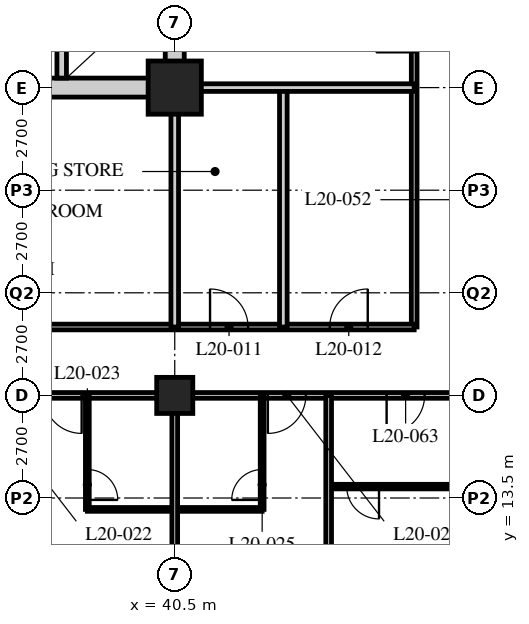
"""IFC4 building model, lengths in metres.
Left out: names, types, materials, properties, quantities, classifications, styles, units other than length and angle.
Written with IfcOpenShell. Run it as: python <this file> out.ifc"""

import sys

from ifc_helpers import new_model, si_unit, direction, frame, frame_2d, origin, origin_2d, place, context, subcontext, project, spatial, rectangle, hollow_rectangle, extrude, element, fill, save


model = new_model("IFC4")
c1 = context("Model", 3, precision=1e-05, world=origin(), true_north=direction((0.0, 1.0)))
c2 = subcontext(c1, "Body", "Model", "MODEL_VIEW")
j1 = project(units=[si_unit("LENGTHUNIT", "METRE"), si_unit("PLANEANGLEUNIT", "RADIAN")], contexts=[c1])
p1 = place(None, origin())
s1 = spatial("IfcSite", under=j1, at=p1, CompositionType="ELEMENT")
p2 = place(p1, origin())
s2 = spatial("IfcBuilding", under=s1, at=p2, CompositionType="ELEMENT")
p3 = place(p2, frame((0.0, 0.0, 80.6)))
s3 = spatial("IfcBuildingStorey", under=s2, at=p3, CompositionType="ELEMENT", Elevation=80.6)
p4 = place(p3, frame((40.5, 16.2, 0.0), z_axis=(0.0, 0.0, 1.0), x_axis=(1.0, 0.0, 0.0)))
e1 = element("IfcColumn", 1, at=p4, inside=s3, PredefinedType="COLUMN", context=c2, shape_type="SweptSolid", body=[
    extrude(hollow_rectangle(XDim=0.95, YDim=0.95, WallThickness=0.095, at=origin_2d()), origin(), (0.0, 0.0, 1.0), 3.4),
])
p5 = place(p3, frame((40.5, 24.3, 0.0), z_axis=(0.0, 0.0, 1.0), x_axis=(1.0, 0.0, 0.0)))
e2 = element("IfcColumn", 2, at=p5, inside=s3, PredefinedType="COLUMN", context=c2, shape_type="SweptSolid", body=[
    extrude(hollow_rectangle(XDim=1.4, YDim=1.4, WallThickness=0.12, at=origin_2d()), origin(), (0.0, 0.0, 1.0), 3.4),
])
p6 = place(p3, frame((12.15, 16.2, 0.0), z_axis=(0.0, 0.0, 1.0), x_axis=(1.0, 0.0, 0.0)))
e3 = element("IfcWall", 3, at=p6, inside=s3, PredefinedType="PARTITIONING", context=c2, shape_type="SweptSolid", body=[
    extrude(rectangle(XDim=36.45, YDim=0.15, at=frame_2d((18.225, 0.0))), origin(), (0.0, 0.0, 1.0), 2.428),
])
p7 = place(p6, frame((6.5, 0.0, 0.0)))
e4 = element("IfcOpeningElement", 4, at=p7, cuts=e3, PredefinedType="OPENING", context=c2, shape_type="SweptSolid", body=[
    extrude(rectangle(XDim=1.0, YDim=2.1, at=frame_2d((0.5, 1.05))), frame((0.0, 0.085, 0.0), z_axis=(0.0, -1.0, 0.0), x_axis=(1.0, 0.0, 0.0)), (0.0, 0.0, 1.0), 0.17),
])
p8 = place(p6, frame((8.4, 0.0, 0.0)))
e5 = element("IfcOpeningElement", 5, at=p8, cuts=e3, PredefinedType="OPENING", context=c2, shape_type="SweptSolid", body=[
    extrude(rectangle(XDim=1.0, YDim=2.1, at=frame_2d((0.5, 1.05))), frame((0.0, 0.085, 0.0), z_axis=(0.0, -1.0, 0.0), x_axis=(1.0, 0.0, 0.0)), (0.0, 0.0, 1.0), 0.17),
])
p9 = place(p6, frame((14.9, 0.0, 0.0)))
e6 = element("IfcOpeningElement", 6, at=p9, cuts=e3, PredefinedType="OPENING", context=c2, shape_type="SweptSolid", body=[
    extrude(rectangle(XDim=1.0, YDim=2.1, at=frame_2d((0.5, 1.05))), frame((0.0, 0.085, 0.0), z_axis=(0.0, -1.0, 0.0), x_axis=(1.0, 0.0, 0.0)), (0.0, 0.0, 1.0), 0.17),
])
p10 = place(p6, frame((16.5, 0.0, 0.0)))
e7 = element("IfcOpeningElement", 7, at=p10, cuts=e3, PredefinedType="OPENING", context=c2, shape_type="SweptSolid", body=[
    extrude(rectangle(XDim=1.0, YDim=2.1, at=frame_2d((0.5, 1.05))), frame((0.0, 0.085, 0.0), z_axis=(0.0, -1.0, 0.0), x_axis=(1.0, 0.0, 0.0)), (0.0, 0.0, 1.0), 0.17),
])
p11 = place(p6, frame((22.7, 0.0, 0.0)))
e8 = element("IfcOpeningElement", 8, at=p11, cuts=e3, PredefinedType="OPENING", context=c2, shape_type="SweptSolid", body=[
    extrude(rectangle(XDim=1.0, YDim=2.1, at=frame_2d((0.5, 1.05))), frame((0.0, 0.085, 0.0), z_axis=(0.0, -1.0, 0.0), x_axis=(1.0, 0.0, 0.0)), (0.0, 0.0, 1.0), 0.17),
])
p12 = place(p6, frame((24.9, 0.0, 0.0)))
e9 = element("IfcOpeningElement", 9, at=p12, cuts=e3, PredefinedType="OPENING", context=c2, shape_type="SweptSolid", body=[
    extrude(rectangle(XDim=1.0, YDim=2.1, at=frame_2d((0.5, 1.05))), frame((0.0, 0.085, 0.0), z_axis=(0.0, -1.0, 0.0), x_axis=(1.0, 0.0, 0.0)), (0.0, 0.0, 1.0), 0.17),
])
p13 = place(p6, frame((30.8, 0.0, 0.0)))
e10 = element("IfcOpeningElement", 10, at=p13, cuts=e3, PredefinedType="OPENING", context=c2, shape_type="SweptSolid", body=[
    extrude(rectangle(XDim=1.0, YDim=2.1, at=frame_2d((0.5, 1.05))), frame((0.0, 0.085, 0.0), z_axis=(0.0, -1.0, 0.0), x_axis=(1.0, 0.0, 0.0)), (0.0, 0.0, 1.0), 0.17),
])
p14 = place(p6, frame((1.525, 0.0, 0.0)))
e11 = element("IfcOpeningElement", 11, at=p14, cuts=e3, PredefinedType="OPENING", context=c2, shape_type="SweptSolid", body=[
    extrude(rectangle(XDim=1.0, YDim=2.1, at=frame_2d((0.5, 1.05))), frame((0.0, 0.085, 0.0), z_axis=(0.0, -1.0, 0.0), x_axis=(1.0, 0.0, 0.0)), (0.0, 0.0, 1.0), 0.17),
])
p15 = place(p6, frame((33.925, 0.0, 0.0)))
e12 = element("IfcOpeningElement", 12, at=p15, cuts=e3, PredefinedType="OPENING", context=c2, shape_type="SweptSolid", body=[
    extrude(rectangle(XDim=1.0, YDim=2.1, at=frame_2d((0.5, 1.05))), frame((0.0, 0.085, 0.0), z_axis=(0.0, -1.0, 0.0), x_axis=(1.0, 0.0, 0.0)), (0.0, 0.0, 1.0), 0.17),
])
p16 = place(p3, frame((46.8, 18.0, 0.0), z_axis=(0.0, 0.0, 1.0), x_axis=(0.0, 1.0, 0.0)))
e13 = element("IfcWall", 13, at=p16, inside=s3, PredefinedType="PARTITIONING", context=c2, shape_type="SweptSolid", body=[
    extrude(rectangle(XDim=22.5, YDim=0.15, at=frame_2d((11.25, 0.0))), origin(), (0.0, 0.0, 1.0), 3.19),
])
p17 = place(p16, frame((7.229, 0.0, 0.0)))
e14 = element("IfcOpeningElement", 14, at=p17, cuts=e13, PredefinedType="OPENING", context=c2, shape_type="SweptSolid", body=[
    extrude(rectangle(XDim=1.0, YDim=2.1, at=frame_2d((0.5, 1.05))), frame((0.0, 0.085, 0.0), z_axis=(0.0, -1.0, 0.0), x_axis=(1.0, 0.0, 0.0)), (0.0, 0.0, 1.0), 0.17),
])
p18 = place(p16, frame((11.279, 0.0, 0.0)))
e15 = element("IfcOpeningElement", 15, at=p18, cuts=e13, PredefinedType="OPENING", context=c2, shape_type="SweptSolid", body=[
    extrude(rectangle(XDim=1.0, YDim=2.1, at=frame_2d((0.5, 1.05))), frame((0.0, 0.085, 0.0), z_axis=(0.0, -1.0, 0.0), x_axis=(1.0, 0.0, 0.0)), (0.0, 0.0, 1.0), 0.17),
])
p19 = place(p16, frame((14.7, 0.0, 0.0)))
e16 = element("IfcOpeningElement", 16, at=p19, cuts=e13, PredefinedType="OPENING", context=c2, shape_type="SweptSolid", body=[
    extrude(rectangle(XDim=1.0, YDim=2.1, at=frame_2d((0.5, 1.05))), frame((0.0, 0.085, 0.0), z_axis=(0.0, -1.0, 0.0), x_axis=(1.0, 0.0, 0.0)), (0.0, 0.0, 1.0), 0.17),
])
p20 = place(p16, frame((18.75, 0.0, 0.0)))
e17 = element("IfcOpeningElement", 17, at=p20, cuts=e13, PredefinedType="OPENING", context=c2, shape_type="SweptSolid", body=[
    extrude(rectangle(XDim=1.0, YDim=2.1, at=frame_2d((0.5, 1.05))), frame((0.0, 0.085, 0.0), z_axis=(0.0, -1.0, 0.0), x_axis=(1.0, 0.0, 0.0)), (0.0, 0.0, 1.0), 0.17),
])
p21 = place(p3, frame((29.56, 18.0, 0.0), z_axis=(0.0, 0.0, 1.0), x_axis=(1.0, 0.0, 0.0)))
e18 = element("IfcWall", 18, at=p21, inside=s3, PredefinedType="PARTITIONING", context=c2, shape_type="SweptSolid", body=[
    extrude(rectangle(XDim=17.24, YDim=0.15, at=frame_2d((8.62, 0.0))), origin(), (0.0, 0.0, 1.0), 3.19),
])
p22 = place(p21, frame((0.29, 0.0, 0.0)))
e19 = element("IfcOpeningElement", 19, at=p22, cuts=e18, PredefinedType="OPENING", context=c2, shape_type="SweptSolid", body=[
    extrude(rectangle(XDim=1.0, YDim=2.1, at=frame_2d((0.5, 1.05))), frame((0.0, 0.085, 0.0), z_axis=(0.0, -1.0, 0.0), x_axis=(1.0, 0.0, 0.0)), (0.0, 0.0, 1.0), 0.17),
])
p23 = place(p21, frame((5.765, 0.0, 0.0)))
e20 = element("IfcOpeningElement", 20, at=p23, cuts=e18, PredefinedType="OPENING", context=c2, shape_type="SweptSolid", body=[
    extrude(rectangle(XDim=1.0, YDim=2.1, at=frame_2d((0.5, 1.05))), frame((0.0, 0.085, 0.0), z_axis=(0.0, -1.0, 0.0), x_axis=(1.0, 0.0, 0.0)), (0.0, 0.0, 1.0), 0.17),
])
p24 = place(p21, frame((11.869, 0.0, 0.0)))
e21 = element("IfcOpeningElement", 21, at=p24, cuts=e18, PredefinedType="OPENING", context=c2, shape_type="SweptSolid", body=[
    extrude(rectangle(XDim=1.0, YDim=2.1, at=frame_2d((0.5, 1.05))), frame((0.0, 0.085, 0.0), z_axis=(0.0, -1.0, 0.0), x_axis=(1.0, 0.0, 0.0)), (0.0, 0.0, 1.0), 0.17),
])
p25 = place(p21, frame((15.019, 0.0, 0.0)))
e22 = element("IfcOpeningElement", 22, at=p25, cuts=e18, PredefinedType="OPENING", context=c2, shape_type="SweptSolid", body=[
    extrude(rectangle(XDim=1.0, YDim=2.1, at=frame_2d((0.5, 1.05))), frame((0.0, 0.085, 0.0), z_axis=(0.0, -1.0, 0.0), x_axis=(1.0, 0.0, 0.0)), (0.0, 0.0, 1.0), 0.17),
])
p26 = place(p3, frame((40.5, 18.0, 0.0), z_axis=(0.0, 0.0, 1.0), x_axis=(0.0, 1.0, 0.0)))
e23 = element("IfcWall", 23, at=p26, inside=s3, PredefinedType="SOLIDWALL", context=c2, shape_type="SweptSolid", body=[
    extrude(rectangle(XDim=6.3, YDim=0.2, at=frame_2d((3.15, 0.0))), origin(), (0.0, 0.0, 1.0), 2.428),
])
p27 = place(p3, frame((43.357, 18.0, 0.0), z_axis=(0.0, 0.0, 1.0), x_axis=(0.0, 1.0, 0.0)))
e24 = element("IfcWall", 24, at=p27, inside=s3, PredefinedType="SOLIDWALL", context=c2, shape_type="SweptSolid", body=[
    extrude(rectangle(XDim=6.3, YDim=0.2, at=frame_2d((3.15, 0.0))), origin(), (0.0, 0.0, 1.0), 3.19),
])
p28 = place(p3, frame((40.5, 24.3, 0.0), z_axis=(0.0, 0.0, 1.0), x_axis=(1.0, 0.0, 0.0)))
e25 = element("IfcWall", 25, at=p28, inside=s3, PredefinedType="SOLIDWALL", context=c2, shape_type="SweptSolid", body=[
    extrude(rectangle(XDim=6.3, YDim=0.2, at=frame_2d((3.15, 0.0))), origin(), (0.0, 0.0, 1.0), 2.428),
])
p29 = place(p3, frame((38.2, 13.2, 0.0), z_axis=(0.0, 0.0, 1.0), x_axis=(1.0, 0.0, 0.0)))
e26 = element("IfcWall", 26, at=p29, inside=s3, PredefinedType="PARTITIONING", context=c2, shape_type="SweptSolid", body=[
    extrude(rectangle(XDim=4.6, YDim=0.1, at=frame_2d((2.3, 0.0))), origin(), (0.0, 0.0, 1.0), 3.19),
])
p30 = place(p3, frame((38.2, 16.2, 0.0), z_axis=(0.0, 0.0, 1.0), x_axis=(0.0, -1.0, 0.0)))
e27 = element("IfcWall", 27, at=p30, inside=s3, PredefinedType="PARTITIONING", context=c2, shape_type="SweptSolid", body=[
    extrude(rectangle(XDim=3.0, YDim=0.1, at=frame_2d((1.5, 0.0))), origin(), (0.0, 0.0, 1.0), 3.19),
])
p31 = place(p30, frame((1.95, 0.0, 0.0)))
e28 = element("IfcOpeningElement", 28, at=p31, cuts=e27, PredefinedType="OPENING", context=c2, shape_type="SweptSolid", body=[
    extrude(rectangle(XDim=0.8, YDim=2.1, at=frame_2d((0.4, 1.05))), frame((0.0, 0.06, 0.0), z_axis=(0.0, -1.0, 0.0), x_axis=(1.0, 0.0, 0.0)), (0.0, 0.0, 1.0), 0.12),
])
p32 = place(p3, frame((40.5, 16.2, 0.0), z_axis=(0.0, 0.0, 1.0), x_axis=(0.0, -1.0, 0.0)))
e29 = element("IfcWall", 29, at=p32, inside=s3, PredefinedType="PARTITIONING", context=c2, shape_type="SweptSolid", body=[
    extrude(rectangle(XDim=15.9, YDim=0.15, at=frame_2d((7.95, 0.0))), origin(), (0.0, 0.0, 1.0), 2.428),
])
p33 = place(p3, frame((42.8, 16.2, 0.0), z_axis=(0.0, 0.0, 1.0), x_axis=(0.0, -1.0, 0.0)))
e30 = element("IfcWall", 30, at=p33, inside=s3, PredefinedType="PARTITIONING", context=c2, shape_type="SweptSolid", body=[
    extrude(rectangle(XDim=3.0, YDim=0.1, at=frame_2d((1.5, 0.0))), origin(), (0.0, 0.0, 1.0), 3.19),
])
p34 = place(p33, frame((1.95, 0.0, 0.0)))
e31 = element("IfcOpeningElement", 31, at=p34, cuts=e30, PredefinedType="OPENING", context=c2, shape_type="SweptSolid", body=[
    extrude(rectangle(XDim=0.8, YDim=2.1, at=frame_2d((0.4, 1.05))), frame((0.0, 0.06, 0.0), z_axis=(0.0, -1.0, 0.0), x_axis=(1.0, 0.0, 0.0)), (0.0, 0.0, 1.0), 0.12),
])
p35 = place(p3, frame((44.55, 13.8, 0.0), z_axis=(0.0, 0.0, 1.0), x_axis=(1.0, 0.0, 0.0)))
e32 = element("IfcWall", 32, at=p35, inside=s3, PredefinedType="PARTITIONING", context=c2, shape_type="SweptSolid", body=[
    extrude(rectangle(XDim=8.05, YDim=0.12, at=frame_2d((4.025, 0.0))), origin(), (0.0, 0.0, 1.0), 3.19),
])
p36 = place(p35, frame((0.475, 0.0, 0.0)))
e33 = element("IfcOpeningElement", 33, at=p36, cuts=e32, PredefinedType="OPENING", context=c2, shape_type="SweptSolid", body=[
    extrude(rectangle(XDim=0.85, YDim=2.1, at=frame_2d((0.425, 1.05))), frame((0.0, 0.07, 0.0), z_axis=(0.0, -1.0, 0.0), x_axis=(1.0, 0.0, 0.0)), (0.0, 0.0, 1.0), 0.14),
])
p37 = place(p35, frame((4.325, 0.0, 0.0)))
e34 = element("IfcOpeningElement", 34, at=p37, cuts=e32, PredefinedType="OPENING", context=c2, shape_type="SweptSolid", body=[
    extrude(rectangle(XDim=0.85, YDim=2.1, at=frame_2d((0.425, 1.05))), frame((0.0, 0.07, 0.0), z_axis=(0.0, -1.0, 0.0), x_axis=(1.0, 0.0, 0.0)), (0.0, 0.0, 1.0), 0.14),
])
p38 = place(p3, frame((44.55, 16.2, 0.0), z_axis=(0.0, 0.0, 1.0), x_axis=(0.0, -1.0, 0.0)))
e35 = element("IfcWall", 35, at=p38, inside=s3, PredefinedType="PARTITIONING", context=c2, shape_type="SweptSolid", body=[
    extrude(rectangle(XDim=15.9, YDim=0.15, at=frame_2d((7.95, 0.0))), origin(), (0.0, 0.0, 1.0), 3.19),
])
p39 = place(p3, frame((15.95, 24.3, 0.0), z_axis=(0.0, 0.0, 1.0), x_axis=(1.0, 0.0, 0.0)))
e36 = element("IfcWall", 36, at=p39, inside=s3, PredefinedType="SOLIDWALL", context=c2, shape_type="SweptSolid", body=[
    extrude(rectangle(XDim=24.8, YDim=0.5, at=frame_2d((12.4, 0.0))), origin(), (0.0, 0.0, 1.0), 2.428),
])
p40 = place(p39, frame((11.5, 0.0, 0.0)))
e37 = element("IfcOpeningElement", 37, at=p40, cuts=e36, PredefinedType="OPENING", context=c2, shape_type="SweptSolid", body=[
    extrude(rectangle(XDim=1.8, YDim=2.4, at=frame_2d((0.9, 1.2))), frame((0.0, 0.26, 0.0), z_axis=(0.0, -1.0, 0.0), x_axis=(1.0, 0.0, 0.0)), (0.0, 0.0, 1.0), 0.52),
])
p41 = place(p3, frame((40.5, 24.55, 0.0), z_axis=(0.0, 0.0, 1.0), x_axis=(0.0, 1.0, 0.0)))
e38 = element("IfcWall", 38, at=p41, inside=s3, PredefinedType="SOLIDWALL", context=c2, shape_type="SweptSolid", body=[
    extrude(rectangle(XDim=15.7, YDim=0.5, at=frame_2d((7.85, 0.0))), origin(), (0.0, 0.0, 1.0), 2.428),
])
p42 = place(p3, frame((37.525, 24.55, 0.0), z_axis=(0.0, 0.0, 1.0), x_axis=(0.0, 1.0, 0.0)))
e39 = element("IfcWall", 39, at=p42, inside=s3, PredefinedType="SOLIDWALL", context=c2, shape_type="SweptSolid", body=[
    extrude(rectangle(XDim=7.75, YDim=0.25, at=frame_2d((3.875, 0.0))), origin(), (0.0, 0.0, 1.0), 3.19),
])
p43 = place(p24, origin())
e40 = element("IfcDoor", 40, at=p43, inside=s3, OperationType="SINGLE_SWING_LEFT", PredefinedType="DOOR", context=c2, shape_type="SweptSolid", body=[
    extrude(rectangle(XDim=1.0, YDim=2.1, at=frame_2d((0.5, 1.05))), frame((0.0, 0.025, 0.0), z_axis=(0.0, -1.0, 0.0), x_axis=(1.0, 0.0, 0.0)), (0.0, 0.0, 1.0), 0.05),
])
fill(e21, e40)
p44 = place(p25, origin())
e41 = element("IfcDoor", 41, at=p44, inside=s3, OperationType="SINGLE_SWING_RIGHT", PredefinedType="DOOR", context=c2, shape_type="SweptSolid", body=[
    extrude(rectangle(XDim=1.0, YDim=2.1, at=frame_2d((0.5, 1.05))), frame((0.0, 0.025, 0.0), z_axis=(0.0, -1.0, 0.0), x_axis=(1.0, 0.0, 0.0)), (0.0, 0.0, 1.0), 0.05),
])
fill(e22, e41)
p45 = place(p31, origin())
e42 = element("IfcDoor", 42, at=p45, inside=s3, OperationType="SINGLE_SWING_RIGHT", PredefinedType="DOOR", context=c2, shape_type="SweptSolid", body=[
    extrude(rectangle(XDim=0.8, YDim=2.1, at=frame_2d((0.4, 1.05))), frame((0.0, 0.025, 0.0), z_axis=(0.0, -1.0, 0.0), x_axis=(1.0, 0.0, 0.0)), (0.0, 0.0, 1.0), 0.05),
])
fill(e28, e42)
p46 = place(p12, origin())
e43 = element("IfcDoor", 43, at=p46, inside=s3, OperationType="SINGLE_SWING_LEFT", PredefinedType="DOOR", context=c2, shape_type="SweptSolid", body=[
    extrude(rectangle(XDim=1.0, YDim=2.1, at=frame_2d((0.5, 1.05))), frame((0.0, 0.025, 0.0), z_axis=(0.0, -1.0, 0.0), x_axis=(1.0, 0.0, 0.0)), (0.0, 0.0, 1.0), 0.05),
])
fill(e9, e43)
p47 = place(p34, origin())
e44 = element("IfcDoor", 44, at=p47, inside=s3, OperationType="SINGLE_SWING_LEFT", PredefinedType="DOOR", context=c2, shape_type="SweptSolid", body=[
    extrude(rectangle(XDim=0.8, YDim=2.1, at=frame_2d((0.4, 1.05))), frame((0.0, 0.025, 0.0), z_axis=(0.0, -1.0, 0.0), x_axis=(1.0, 0.0, 0.0)), (0.0, 0.0, 1.0), 0.05),
])
fill(e31, e44)
p48 = place(p13, origin())
e45 = element("IfcDoor", 45, at=p48, inside=s3, OperationType="SINGLE_SWING_RIGHT", PredefinedType="DOOR", context=c2, shape_type="SweptSolid", body=[
    extrude(rectangle(XDim=1.0, YDim=2.1, at=frame_2d((0.5, 1.05))), frame((0.0, 0.025, 0.0), z_axis=(0.0, -1.0, 0.0), x_axis=(1.0, 0.0, 0.0)), (0.0, 0.0, 1.0), 0.05),
])
fill(e10, e45)
p49 = place(p15, origin())
e46 = element("IfcDoor", 46, at=p49, inside=s3, OperationType="SINGLE_SWING_RIGHT", PredefinedType="DOOR", context=c2, shape_type="SweptSolid", body=[
    extrude(rectangle(XDim=1.0, YDim=2.1, at=frame_2d((0.5, 1.05))), frame((0.0, 0.025, 0.0), z_axis=(0.0, -1.0, 0.0), x_axis=(1.0, 0.0, 0.0)), (0.0, 0.0, 1.0), 0.05),
])
fill(e12, e46)
p50 = place(p36, origin())
e47 = element("IfcDoor", 47, at=p50, inside=s3, OperationType="SINGLE_SWING_LEFT", PredefinedType="DOOR", context=c2, shape_type="SweptSolid", body=[
    extrude(rectangle(XDim=0.85, YDim=2.1, at=frame_2d((0.425, 1.05))), frame((0.0, 0.025, 0.0), z_axis=(0.0, -1.0, 0.0), x_axis=(1.0, 0.0, 0.0)), (0.0, 0.0, 1.0), 0.05),
])
fill(e33, e47)
save(model, sys.argv[1])
